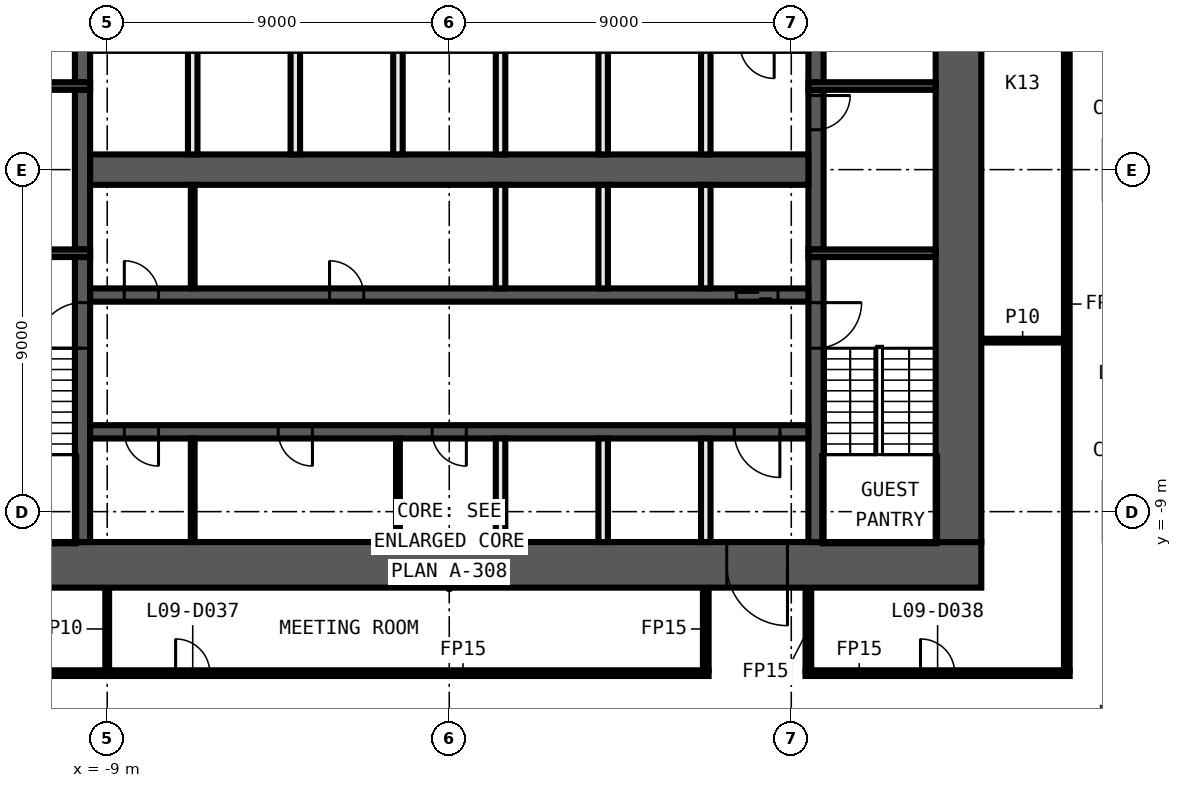
"""IFC4 building model, lengths in metres.
Left out: names, types, materials, properties, quantities, classifications, styles, units other than length and angle.
Written with IfcOpenShell. Run it as: python <this file> out.ifc"""

import sys

from ifc_helpers import new_model, si_unit, direction, frame, frame_2d, origin, place, context, subcontext, project, spatial, rectangle, extrude, element, fill, save


model = new_model("IFC4")
c1 = context("Model", 3, precision=1e-05, world=origin(), true_north=direction((0.0, 1.0)))
c2 = subcontext(c1, "Body", "Model", "MODEL_VIEW")
j1 = project(units=[si_unit("LENGTHUNIT", "METRE"), si_unit("PLANEANGLEUNIT", "RADIAN")], contexts=[c1])
p1 = place(None, origin())
s1 = spatial("IfcSite", under=j1, at=p1, CompositionType="ELEMENT")
p2 = place(p1, origin())
s2 = spatial("IfcBuilding", under=s1, at=p2, CompositionType="ELEMENT")
p3 = place(p2, frame((0.0, 0.0, 55.1)))
s3 = spatial("IfcBuildingStorey", under=s2, at=p3, CompositionType="ELEMENT", Elevation=55.1)
p4 = place(p3, frame((-16.325, -13.25, 0.0), z_axis=(0.0, 0.0, 1.0), x_axis=(1.0, 0.0, 0.0)))
e1 = element("IfcWall", 1, at=p4, inside=s3, PredefinedType="PARTITIONING", context=c2, shape_type="SweptSolid", body=[
    extrude(rectangle(XDim=23.15, YDim=0.15, at=frame_2d((11.575, 0.0))), origin(), (0.0, 0.0, 1.0), 3.3),
])
p5 = place(p4, frame((3.25, 0.0, 0.0)))
e2 = element("IfcOpeningElement", 2, at=p5, cuts=e1, PredefinedType="OPENING", context=c2, shape_type="SweptSolid", body=[
    extrude(rectangle(XDim=0.9, YDim=2.1, at=frame_2d((0.45, 1.05))), frame((0.0, 0.085, 0.0), z_axis=(0.0, -1.0, 0.0), x_axis=(1.0, 0.0, 0.0)), (0.0, 0.0, 1.0), 0.17),
])
p6 = place(p4, frame((9.125, 0.0, 0.0)))
e3 = element("IfcOpeningElement", 3, at=p6, cuts=e1, PredefinedType="OPENING", context=c2, shape_type="SweptSolid", body=[
    extrude(rectangle(XDim=0.9, YDim=2.1, at=frame_2d((0.45, 1.05))), frame((0.0, 0.085, 0.0), z_axis=(0.0, -1.0, 0.0), x_axis=(1.0, 0.0, 0.0)), (0.0, 0.0, 1.0), 0.17),
])
p7 = place(p3, frame((9.375, -13.25, 0.0), z_axis=(0.0, 0.0, 1.0), x_axis=(1.0, 0.0, 0.0)))
e4 = element("IfcWall", 4, at=p7, inside=s3, PredefinedType="PARTITIONING", context=c2, shape_type="SweptSolid", body=[
    extrude(rectangle(XDim=6.95, YDim=0.15, at=frame_2d((3.475, 0.0))), origin(), (0.0, 0.0, 1.0), 3.3),
])
p8 = place(p7, frame((3.025, 0.0, 0.0)))
e5 = element("IfcOpeningElement", 5, at=p8, cuts=e4, PredefinedType="OPENING", context=c2, shape_type="SweptSolid", body=[
    extrude(rectangle(XDim=0.9, YDim=2.1, at=frame_2d((0.45, 1.05))), frame((0.0, 0.085, 0.0), z_axis=(0.0, -1.0, 0.0), x_axis=(1.0, 0.0, 0.0)), (0.0, 0.0, 1.0), 0.17),
])
p9 = place(p3, frame((14.0, -4.5, 0.0), z_axis=(0.0, 0.0, 1.0), x_axis=(1.0, 0.0, 0.0)))
e6 = element("IfcWall", 6, at=p9, inside=s3, PredefinedType="PARTITIONING", context=c2, shape_type="SweptSolid", body=[
    extrude(rectangle(XDim=2.175, YDim=0.1, at=frame_2d((1.087, 0.0))), origin(), (0.0, 0.0, 1.0), 3.3),
])
p10 = place(p3, frame((16.25, -13.175, 0.0), z_axis=(0.0, 0.0, 1.0), x_axis=(0.0, 1.0, 0.0)))
e7 = element("IfcWall", 7, at=p10, inside=s3, PredefinedType="PARTITIONING", context=c2, shape_type="SweptSolid", body=[
    extrude(rectangle(XDim=26.35, YDim=0.15, at=frame_2d((13.175, 0.0))), origin(), (0.0, 0.0, 1.0), 3.3),
])
p11 = place(p10, frame((19.475, 0.0, 0.0)))
e8 = element("IfcOpeningElement", 8, at=p11, cuts=e7, PredefinedType="OPENING", context=c2, shape_type="SweptSolid", body=[
    extrude(rectangle(XDim=0.9, YDim=2.1, at=frame_2d((0.45, 1.05))), frame((0.0, 0.085, 0.0), z_axis=(0.0, -1.0, 0.0), x_axis=(1.0, 0.0, 0.0)), (0.0, 0.0, 1.0), 0.17),
])
for number, where, z_axis, x_axis in (
    (9, (9.45, -13.175, 0.0), (0.0, 0.0, 1.0), (0.0, 1.0, 0.0)),
    (10, (6.75, -13.175, 0.0), (0.0, 0.0, 1.0), (0.0, 1.0, 0.0)),
):
    element("IfcWall", number, at=place(p3, frame(where, z_axis=z_axis, x_axis=x_axis)), inside=s3, PredefinedType="PARTITIONING", context=c2, shape_type="SweptSolid", body=[
        extrude(rectangle(XDim=2.175, YDim=0.15, at=frame_2d((1.087, 0.0))), origin(), (0.0, 0.0, 1.0), 3.3),
    ])
p12 = place(p3, frame((-9.0, -13.175, 0.0), z_axis=(0.0, 0.0, 1.0), x_axis=(0.0, 1.0, 0.0)))
e11 = element("IfcWall", 11, at=p12, inside=s3, PredefinedType="PARTITIONING", context=c2, shape_type="SweptSolid", body=[
    extrude(rectangle(XDim=2.175, YDim=0.1, at=frame_2d((1.087, 0.0))), origin(), (0.0, 0.0, 1.0), 3.3),
])
p13 = place(p3, frame((14.0, -10.4, 0.0), z_axis=(0.0, 0.0, 1.0), x_axis=(-1.0, 0.0, 0.0)))
e12 = element("IfcWall", 12, at=p13, inside=s3, PredefinedType="SHEAR", context=c2, shape_type="SweptSolid", body=[
    extrude(rectangle(XDim=28.0, YDim=1.2, at=frame_2d((14.0, 0.0))), origin(), (0.0, 0.0, 1.0), 3.3),
])
p14 = place(p13, frame((5.1, 0.0, 0.0)))
e13 = element("IfcOpeningElement", 13, at=p14, cuts=e12, PredefinedType="OPENING", context=c2, shape_type="SweptSolid", body=[
    extrude(rectangle(XDim=1.6, YDim=2.1, at=frame_2d((0.8, 1.05))), frame((0.0, 0.61, 0.0), z_axis=(0.0, -1.0, 0.0), x_axis=(1.0, 0.0, 0.0)), (0.0, 0.0, 1.0), 1.22),
])
p15 = place(p3, frame((13.4, 9.8, 0.0), z_axis=(0.0, 0.0, 1.0), x_axis=(0.0, -1.0, 0.0)))
e14 = element("IfcWall", 14, at=p15, inside=s3, PredefinedType="SHEAR", context=c2, shape_type="SweptSolid", body=[
    extrude(rectangle(XDim=19.6, YDim=1.2, at=frame_2d((9.8, 0.0))), origin(), (0.0, 0.0, 1.0), 3.3),
])
p16 = place(p3, frame((9.65, -2.3, 0.0), z_axis=(0.0, 0.0, 1.0), x_axis=(0.0, -1.0, 0.0)))
e15 = element("IfcWall", 15, at=p16, inside=s3, PredefinedType="SHEAR", context=c2, shape_type="SweptSolid", body=[
    extrude(rectangle(XDim=7.5, YDim=0.4, at=frame_2d((3.75, 0.0))), origin(), (0.0, 0.0, 1.0), 3.3),
])
p17 = place(p16, frame((1.2, 0.0, 0.0)))
e16 = element("IfcOpeningElement", 16, at=p17, cuts=e15, PredefinedType="OPENING", context=c2, shape_type="SweptSolid", body=[
    extrude(rectangle(XDim=1.2, YDim=2.1, at=frame_2d((0.6, 1.05))), frame((0.0, 0.21, 0.0), z_axis=(0.0, -1.0, 0.0), x_axis=(1.0, 0.0, 0.0)), (0.0, 0.0, 1.0), 0.42),
])
p18 = place(p3, frame((9.65, 2.1, 0.0), z_axis=(0.0, 0.0, 1.0), x_axis=(0.0, -1.0, 0.0)))
e17 = element("IfcWall", 17, at=p18, inside=s3, PredefinedType="SHEAR", context=c2, shape_type="SweptSolid", body=[
    extrude(rectangle(XDim=4.2, YDim=0.4, at=frame_2d((2.1, 0.0))), origin(), (0.0, 0.0, 1.0), 3.3),
])
p19 = place(p18, frame((0.15, 0.0, 0.0)))
e18 = element("IfcOpeningElement", 18, at=p19, cuts=e17, PredefinedType="OPENING", context=c2, shape_type="SweptSolid", body=[
    extrude(rectangle(XDim=0.9, YDim=2.1, at=frame_2d((0.45, 1.05))), frame((0.0, 0.21, 0.0), z_axis=(0.0, -1.0, 0.0), x_axis=(1.0, 0.0, 0.0)), (0.0, 0.0, 1.0), 0.42),
])
p20 = place(p3, frame((9.65, 9.8, 0.0), z_axis=(0.0, 0.0, 1.0), x_axis=(0.0, -1.0, 0.0)))
e19 = element("IfcWall", 19, at=p20, inside=s3, PredefinedType="SHEAR", context=c2, shape_type="SweptSolid", body=[
    extrude(rectangle(XDim=7.5, YDim=0.4, at=frame_2d((3.75, 0.0))), origin(), (0.0, 0.0, 1.0), 3.3),
])
p21 = place(p20, frame((5.1, 0.0, 0.0)))
e20 = element("IfcOpeningElement", 20, at=p21, cuts=e19, PredefinedType="OPENING", context=c2, shape_type="SweptSolid", body=[
    extrude(rectangle(XDim=1.2, YDim=2.1, at=frame_2d((0.6, 1.05))), frame((0.0, 0.21, 0.0), z_axis=(0.0, -1.0, 0.0), x_axis=(1.0, 0.0, 0.0)), (0.0, 0.0, 1.0), 0.42),
])
p22 = place(p3, frame((-9.65, -9.8, 0.0), z_axis=(0.0, 0.0, 1.0), x_axis=(0.0, 1.0, 0.0)))
e21 = element("IfcWall", 21, at=p22, inside=s3, PredefinedType="SHEAR", context=c2, shape_type="SweptSolid", body=[
    extrude(rectangle(XDim=7.5, YDim=0.4, at=frame_2d((3.75, 0.0))), origin(), (0.0, 0.0, 1.0), 3.3),
])
p23 = place(p22, frame((5.1, 0.0, 0.0)))
e22 = element("IfcOpeningElement", 22, at=p23, cuts=e21, PredefinedType="OPENING", context=c2, shape_type="SweptSolid", body=[
    extrude(rectangle(XDim=1.2, YDim=2.1, at=frame_2d((0.6, 1.05))), frame((0.0, 0.21, 0.0), z_axis=(0.0, -1.0, 0.0), x_axis=(1.0, 0.0, 0.0)), (0.0, 0.0, 1.0), 0.42),
])
p24 = place(p3, frame((-9.65, -2.1, 0.0), z_axis=(0.0, 0.0, 1.0), x_axis=(0.0, 1.0, 0.0)))
e23 = element("IfcWall", 23, at=p24, inside=s3, PredefinedType="SHEAR", context=c2, shape_type="SweptSolid", body=[
    extrude(rectangle(XDim=4.2, YDim=0.4, at=frame_2d((2.1, 0.0))), origin(), (0.0, 0.0, 1.0), 3.3),
])
p25 = place(p3, frame((-9.65, 2.3, 0.0), z_axis=(0.0, 0.0, 1.0), x_axis=(0.0, 1.0, 0.0)))
e24 = element("IfcWall", 24, at=p25, inside=s3, PredefinedType="SHEAR", context=c2, shape_type="SweptSolid", body=[
    extrude(rectangle(XDim=7.5, YDim=0.4, at=frame_2d((3.75, 0.0))), origin(), (0.0, 0.0, 1.0), 3.3),
])
p26 = place(p25, frame((1.2, 0.0, 0.0)))
e25 = element("IfcOpeningElement", 25, at=p26, cuts=e24, PredefinedType="OPENING", context=c2, shape_type="SweptSolid", body=[
    extrude(rectangle(XDim=1.2, YDim=2.1, at=frame_2d((0.6, 1.05))), frame((0.0, 0.21, 0.0), z_axis=(0.0, -1.0, 0.0), x_axis=(1.0, 0.0, 0.0)), (0.0, 0.0, 1.0), 0.42),
])
for number, where, z_axis, x_axis in (
    (26, (9.45, 2.2, 0.0), (0.0, 0.0, 1.0), (1.0, 0.0, 0.0)),
    (27, (-9.45, 2.2, 0.0), (0.0, 0.0, 1.0), (-1.0, 0.0, 0.0)),
    (28, (9.45, -2.2, 0.0), (0.0, 0.0, 1.0), (1.0, 0.0, 0.0)),
    (29, (-9.45, -2.2, 0.0), (0.0, 0.0, 1.0), (-1.0, 0.0, 0.0)),
):
    element("IfcWall", number, at=place(p3, frame(where, z_axis=z_axis, x_axis=x_axis)), inside=s3, PredefinedType="SHEAR", context=c2, shape_type="SweptSolid", body=[
        extrude(rectangle(XDim=3.35, YDim=0.2, at=frame_2d((1.675, 0.0))), origin(), (0.0, 0.0, 1.0), 3.3),
    ])
p27 = place(p3, frame((-9.45, -3.3, 0.0), z_axis=(0.0, 0.0, 1.0), x_axis=(1.0, 0.0, 0.0)))
e30 = element("IfcWall", 30, at=p27, inside=s3, PredefinedType="SHEAR", context=c2, shape_type="SweptSolid", body=[
    extrude(rectangle(XDim=18.9, YDim=0.35, at=frame_2d((9.45, 0.0))), origin(), (0.0, 0.0, 1.0), 3.3),
])
p28 = place(p27, frame((17.0, 0.0, 0.0)))
e31 = element("IfcOpeningElement", 31, at=p28, cuts=e30, PredefinedType="OPENING", context=c2, shape_type="SweptSolid", body=[
    extrude(rectangle(XDim=1.1, YDim=2.1, at=frame_2d((0.55, 1.05))), frame((0.0, 0.185, 0.0), z_axis=(0.0, -1.0, 0.0), x_axis=(1.0, 0.0, 0.0)), (0.0, 0.0, 1.0), 0.37),
])
p29 = place(p27, frame((0.9, 0.0, 0.0)))
e32 = element("IfcOpeningElement", 32, at=p29, cuts=e30, PredefinedType="OPENING", context=c2, shape_type="SweptSolid", body=[
    extrude(rectangle(XDim=0.9, YDim=2.1, at=frame_2d((0.45, 1.05))), frame((0.0, 0.185, 0.0), z_axis=(0.0, -1.0, 0.0), x_axis=(1.0, 0.0, 0.0)), (0.0, 0.0, 1.0), 0.37),
])
p30 = place(p27, frame((6.3, 0.0, 0.0)))
e33 = element("IfcOpeningElement", 33, at=p30, cuts=e30, PredefinedType="OPENING", context=c2, shape_type="SweptSolid", body=[
    extrude(rectangle(XDim=0.9, YDim=2.1, at=frame_2d((0.45, 1.05))), frame((0.0, 0.185, 0.0), z_axis=(0.0, -1.0, 0.0), x_axis=(1.0, 0.0, 0.0)), (0.0, 0.0, 1.0), 0.37),
])
p31 = place(p3, frame((9.45, -6.9, 0.0), z_axis=(0.0, 0.0, 1.0), x_axis=(-1.0, 0.0, 0.0)))
e34 = element("IfcWall", 34, at=p31, inside=s3, PredefinedType="SHEAR", context=c2, shape_type="SweptSolid", body=[
    extrude(rectangle(XDim=18.9, YDim=0.35, at=frame_2d((9.45, 0.0))), origin(), (0.0, 0.0, 1.0), 3.3),
])
p32 = place(p31, frame((0.75, 0.0, 0.0)))
e35 = element("IfcOpeningElement", 35, at=p32, cuts=e34, PredefinedType="OPENING", context=c2, shape_type="SweptSolid", body=[
    extrude(rectangle(XDim=1.2, YDim=2.1, at=frame_2d((0.6, 1.05))), frame((0.0, 0.185, 0.0), z_axis=(0.0, -1.0, 0.0), x_axis=(1.0, 0.0, 0.0)), (0.0, 0.0, 1.0), 0.37),
])
p33 = place(p31, frame((17.1, 0.0, 0.0)))
e36 = element("IfcOpeningElement", 36, at=p33, cuts=e34, PredefinedType="OPENING", context=c2, shape_type="SweptSolid", body=[
    extrude(rectangle(XDim=0.9, YDim=2.1, at=frame_2d((0.45, 1.05))), frame((0.0, 0.185, 0.0), z_axis=(0.0, -1.0, 0.0), x_axis=(1.0, 0.0, 0.0)), (0.0, 0.0, 1.0), 0.37),
])
p34 = place(p31, frame((13.05, 0.0, 0.0)))
e37 = element("IfcOpeningElement", 37, at=p34, cuts=e34, PredefinedType="OPENING", context=c2, shape_type="SweptSolid", body=[
    extrude(rectangle(XDim=0.9, YDim=2.1, at=frame_2d((0.45, 1.05))), frame((0.0, 0.185, 0.0), z_axis=(0.0, -1.0, 0.0), x_axis=(1.0, 0.0, 0.0)), (0.0, 0.0, 1.0), 0.37),
])
p35 = place(p31, frame((9.0, 0.0, 0.0)))
e38 = element("IfcOpeningElement", 38, at=p35, cuts=e34, PredefinedType="OPENING", context=c2, shape_type="SweptSolid", body=[
    extrude(rectangle(XDim=0.9, YDim=2.1, at=frame_2d((0.45, 1.05))), frame((0.0, 0.185, 0.0), z_axis=(0.0, -1.0, 0.0), x_axis=(1.0, 0.0, 0.0)), (0.0, 0.0, 1.0), 0.37),
])
p36 = place(p3, frame((-9.45, 0.0, 0.0), z_axis=(0.0, 0.0, 1.0), x_axis=(1.0, 0.0, 0.0)))
e39 = element("IfcWall", 39, at=p36, inside=s3, PredefinedType="SHEAR", context=c2, shape_type="SweptSolid", body=[
    extrude(rectangle(XDim=18.9, YDim=0.8, at=frame_2d((9.45, 0.0))), origin(), (0.0, 0.0, 1.0), 3.3),
])
for number, where, z_axis, x_axis in (
    (40, (6.75, -9.8, 0.0), (0.0, 0.0, 1.0), (0.0, 1.0, 0.0)),
    (41, (6.75, -3.125, 0.0), (0.0, 0.0, 1.0), (0.0, 1.0, 0.0)),
    (42, (6.75, 0.4, 0.0), (0.0, 0.0, 1.0), (0.0, 1.0, 0.0)),
    (43, (4.05, -9.8, 0.0), (0.0, 0.0, 1.0), (0.0, 1.0, 0.0)),
    (44, (4.05, -3.125, 0.0), (0.0, 0.0, 1.0), (0.0, 1.0, 0.0)),
    (45, (4.05, 0.4, 0.0), (0.0, 0.0, 1.0), (0.0, 1.0, 0.0)),
    (46, (1.35, -9.8, 0.0), (0.0, 0.0, 1.0), (0.0, 1.0, 0.0)),
    (47, (1.35, -3.125, 0.0), (0.0, 0.0, 1.0), (0.0, 1.0, 0.0)),
    (48, (1.35, 0.4, 0.0), (0.0, 0.0, 1.0), (0.0, 1.0, 0.0)),
):
    element("IfcWall", number, at=place(p3, frame(where, z_axis=z_axis, x_axis=x_axis)), inside=s3, PredefinedType="SOLIDWALL", context=c2, shape_type="SweptSolid", body=[
        extrude(rectangle(XDim=2.725, YDim=0.25, at=frame_2d((1.363, 0.0))), origin(), (0.0, 0.0, 1.0), 3.3),
    ])
p37 = place(p3, frame((-1.35, -9.8, 0.0), z_axis=(0.0, 0.0, 1.0), x_axis=(0.0, 1.0, 0.0)))
e49 = element("IfcWall", 49, at=p37, inside=s3, PredefinedType="PARTITIONING", context=c2, shape_type="SweptSolid", body=[
    extrude(rectangle(XDim=2.725, YDim=0.1, at=frame_2d((1.363, 0.0))), origin(), (0.0, 0.0, 1.0), 3.3),
])
for number, where, z_axis, x_axis in (
    (50, (-1.35, 0.4, 0.0), (0.0, 0.0, 1.0), (0.0, 1.0, 0.0)),
    (51, (-4.05, 0.4, 0.0), (0.0, 0.0, 1.0), (0.0, 1.0, 0.0)),
):
    element("IfcWall", number, at=place(p3, frame(where, z_axis=z_axis, x_axis=x_axis)), inside=s3, PredefinedType="SOLIDWALL", context=c2, shape_type="SweptSolid", body=[
        extrude(rectangle(XDim=2.725, YDim=0.25, at=frame_2d((1.363, 0.0))), origin(), (0.0, 0.0, 1.0), 3.3),
    ])
for number, where, z_axis, x_axis in (
    (52, (-6.75, -9.8, 0.0), (0.0, 0.0, 1.0), (0.0, 1.0, 0.0)),
    (53, (-6.75, -3.125, 0.0), (0.0, 0.0, 1.0), (0.0, 1.0, 0.0)),
):
    element("IfcWall", number, at=place(p3, frame(where, z_axis=z_axis, x_axis=x_axis)), inside=s3, PredefinedType="PARTITIONING", context=c2, shape_type="SweptSolid", body=[
        extrude(rectangle(XDim=2.725, YDim=0.1, at=frame_2d((1.363, 0.0))), origin(), (0.0, 0.0, 1.0), 3.3),
    ])
p38 = place(p3, frame((-6.75, 0.4, 0.0), z_axis=(0.0, 0.0, 1.0), x_axis=(0.0, 1.0, 0.0)))
e54 = element("IfcWall", 54, at=p38, inside=s3, PredefinedType="SOLIDWALL", context=c2, shape_type="SweptSolid", body=[
    extrude(rectangle(XDim=2.725, YDim=0.25, at=frame_2d((1.363, 0.0))), origin(), (0.0, 0.0, 1.0), 3.3),
])
p39 = place(p6, origin())
e55 = element("IfcDoor", 55, at=p39, inside=s3, OperationType="SINGLE_SWING_RIGHT", PredefinedType="DOOR", context=c2, shape_type="SweptSolid", body=[
    extrude(rectangle(XDim=0.9, YDim=2.1, at=frame_2d((0.45, 1.05))), frame((0.0, 0.025, 0.0), z_axis=(0.0, -1.0, 0.0), x_axis=(1.0, 0.0, 0.0)), (0.0, 0.0, 1.0), 0.05),
])
fill(e3, e55)
p40 = place(p8, origin())
e56 = element("IfcDoor", 56, at=p40, inside=s3, OperationType="SINGLE_SWING_LEFT", PredefinedType="DOOR", context=c2, shape_type="SweptSolid", body=[
    extrude(rectangle(XDim=0.9, YDim=2.1, at=frame_2d((0.45, 1.05))), frame((0.0, 0.025, 0.0), z_axis=(0.0, -1.0, 0.0), x_axis=(1.0, 0.0, 0.0)), (0.0, 0.0, 1.0), 0.05),
])
fill(e5, e56)
p41 = place(p19, origin())
e57 = element("IfcDoor", 57, at=p41, inside=s3, OperationType="SINGLE_SWING_RIGHT", PredefinedType="DOOR", context=c2, shape_type="SweptSolid", body=[
    extrude(rectangle(XDim=0.9, YDim=2.1, at=frame_2d((0.45, 1.05))), frame((0.0, 0.025, 0.0), z_axis=(0.0, -1.0, 0.0), x_axis=(1.0, 0.0, 0.0)), (0.0, 0.0, 1.0), 0.05),
])
fill(e18, e57)
p42 = place(p28, origin())
e58 = element("IfcDoor", 58, at=p42, inside=s3, OperationType="DOUBLE_DOOR_SLIDING", PredefinedType="DOOR", context=c2, shape_type="SweptSolid", body=[
    extrude(rectangle(XDim=1.1, YDim=2.1, at=frame_2d((0.55, 1.05))), frame((0.0, 0.025, 0.0), z_axis=(0.0, -1.0, 0.0), x_axis=(1.0, 0.0, 0.0)), (0.0, 0.0, 1.0), 0.05),
])
fill(e31, e58)
p43 = place(p14, origin())
e59 = element("IfcDoor", 59, at=p43, inside=s3, OperationType="DOUBLE_DOOR_SINGLE_SWING", PredefinedType="DOOR", context=c2, shape_type="SweptSolid", body=[
    extrude(rectangle(XDim=1.6, YDim=2.1, at=frame_2d((0.8, 1.05))), frame((0.0, 0.025, 0.0), z_axis=(0.0, -1.0, 0.0), x_axis=(1.0, 0.0, 0.0)), (0.0, 0.0, 1.0), 0.05),
])
fill(e13, e59)
p44 = place(p32, origin())
e60 = element("IfcDoor", 60, at=p44, inside=s3, OperationType="SINGLE_SWING_LEFT", PredefinedType="DOOR", context=c2, shape_type="SweptSolid", body=[
    extrude(rectangle(XDim=1.2, YDim=2.1, at=frame_2d((0.6, 1.05))), frame((0.0, 0.025, 0.0), z_axis=(0.0, -1.0, 0.0), x_axis=(1.0, 0.0, 0.0)), (0.0, 0.0, 1.0), 0.05),
])
fill(e35, e60)
p45 = place(p29, origin())
e61 = element("IfcDoor", 61, at=p45, inside=s3, OperationType="SINGLE_SWING_RIGHT", PredefinedType="DOOR", context=c2, shape_type="SweptSolid", body=[
    extrude(rectangle(XDim=0.9, YDim=2.1, at=frame_2d((0.45, 1.05))), frame((0.0, 0.025, 0.0), z_axis=(0.0, -1.0, 0.0), x_axis=(1.0, 0.0, 0.0)), (0.0, 0.0, 1.0), 0.05),
])
fill(e32, e61)
p46 = place(p30, origin())
e62 = element("IfcDoor", 62, at=p46, inside=s3, OperationType="SINGLE_SWING_LEFT", PredefinedType="DOOR", context=c2, shape_type="SweptSolid", body=[
    extrude(rectangle(XDim=0.9, YDim=2.1, at=frame_2d((0.45, 1.05))), frame((0.0, 0.025, 0.0), z_axis=(0.0, -1.0, 0.0), x_axis=(1.0, 0.0, 0.0)), (0.0, 0.0, 1.0), 0.05),
])
fill(e33, e62)
p47 = place(p33, origin())
e63 = element("IfcDoor", 63, at=p47, inside=s3, OperationType="SINGLE_SWING_RIGHT", PredefinedType="DOOR", context=c2, shape_type="SweptSolid", body=[
    extrude(rectangle(XDim=0.9, YDim=2.1, at=frame_2d((0.45, 1.05))), frame((0.0, 0.025, 0.0), z_axis=(0.0, -1.0, 0.0), x_axis=(1.0, 0.0, 0.0)), (0.0, 0.0, 1.0), 0.05),
])
fill(e36, e63)
p48 = place(p34, origin())
e64 = element("IfcDoor", 64, at=p48, inside=s3, OperationType="SINGLE_SWING_LEFT", PredefinedType="DOOR", context=c2, shape_type="SweptSolid", body=[
    extrude(rectangle(XDim=0.9, YDim=2.1, at=frame_2d((0.45, 1.05))), frame((0.0, 0.025, 0.0), z_axis=(0.0, -1.0, 0.0), x_axis=(1.0, 0.0, 0.0)), (0.0, 0.0, 1.0), 0.05),
])
fill(e37, e64)
p49 = place(p35, origin())
e65 = element("IfcDoor", 65, at=p49, inside=s3, OperationType="SINGLE_SWING_RIGHT", PredefinedType="DOOR", context=c2, shape_type="SweptSolid", body=[
    extrude(rectangle(XDim=0.9, YDim=2.1, at=frame_2d((0.45, 1.05))), frame((0.0, 0.025, 0.0), z_axis=(0.0, -1.0, 0.0), x_axis=(1.0, 0.0, 0.0)), (0.0, 0.0, 1.0), 0.05),
])
fill(e38, e65)
p50 = place(p17, origin())
e66 = element("IfcDoor", 66, at=p50, inside=s3, OperationType="SINGLE_SWING_RIGHT", PredefinedType="DOOR", context=c2, shape_type="SweptSolid", body=[
    extrude(rectangle(XDim=1.2, YDim=2.1, at=frame_2d((0.6, 1.05))), frame((0.0, 0.025, 0.0), z_axis=(0.0, -1.0, 0.0), x_axis=(1.0, 0.0, 0.0)), (0.0, 0.0, 1.0), 0.05),
])
fill(e16, e66)
p51 = place(p23, origin())
e67 = element("IfcDoor", 67, at=p51, inside=s3, OperationType="SINGLE_SWING_LEFT", PredefinedType="DOOR", context=c2, shape_type="SweptSolid", body=[
    extrude(rectangle(XDim=1.2, YDim=2.1, at=frame_2d((0.6, 1.05))), frame((0.0, 0.025, 0.0), z_axis=(0.0, -1.0, 0.0), x_axis=(1.0, 0.0, 0.0)), (0.0, 0.0, 1.0), 0.05),
])
fill(e22, e67)
save(model, sys.argv[1])
